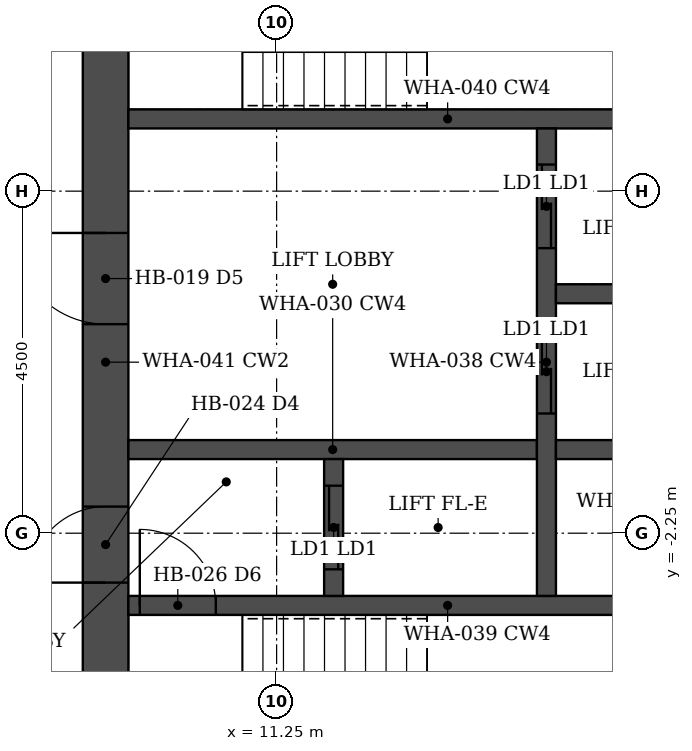
"""IFC4 building model, lengths in metres.
Left out: names, types, materials, properties, quantities, classifications, styles, units other than length and angle.
Written with IfcOpenShell. Run it as: python <this file> out.ifc"""

import sys

from ifc_helpers import new_model, si_unit, direction, frame, frame_2d, origin, place, context, subcontext, project, spatial, rectangle, extrude, element, fill, save


model = new_model("IFC4")
c1 = context("Model", 3, precision=1e-05, world=origin(), true_north=direction((0.0, 1.0)))
c2 = subcontext(c1, "Body", "Model", "MODEL_VIEW")
j1 = project(units=[si_unit("LENGTHUNIT", "METRE"), si_unit("PLANEANGLEUNIT", "RADIAN")], contexts=[c1])
p1 = place(None, origin())
s1 = spatial("IfcSite", under=j1, at=p1, CompositionType="ELEMENT")
p2 = place(p1, origin())
s2 = spatial("IfcBuilding", under=s1, at=p2, CompositionType="ELEMENT")
p3 = place(p2, frame((0.0, 0.0, 129.2)))
s3 = spatial("IfcBuildingStorey", under=s2, at=p3, CompositionType="ELEMENT", Elevation=129.2)
p4 = place(p3, frame((9.0, -6.45, 0.0), z_axis=(0.0, 0.0, 1.0), x_axis=(0.0, 1.0, 0.0)))
e1 = element("IfcWall", 1, at=p4, inside=s3, PredefinedType="SHEAR", context=c2, shape_type="SweptSolid", body=[
    extrude(rectangle(XDim=12.9, YDim=0.6, at=frame_2d((6.45, 0.0))), origin(), (0.0, 0.0, 1.0), 3.6),
])
p5 = place(p4, frame((3.55, 0.0, 0.0)))
e2 = element("IfcOpeningElement", 2, at=p5, cuts=e1, PredefinedType="OPENING", context=c2, shape_type="SweptSolid", body=[
    extrude(rectangle(XDim=1.0, YDim=2.1, at=frame_2d((0.5, 1.05))), frame((0.0, 0.31, 0.0), z_axis=(0.0, -1.0, 0.0), x_axis=(1.0, 0.0, 0.0)), (0.0, 0.0, 1.0), 0.62),
])
p6 = place(p4, frame((6.95, 0.0, 0.0)))
e3 = element("IfcOpeningElement", 3, at=p6, cuts=e1, PredefinedType="OPENING", context=c2, shape_type="SweptSolid", body=[
    extrude(rectangle(XDim=1.2, YDim=2.1, at=frame_2d((0.6, 1.05))), frame((0.0, 0.31, 0.0), z_axis=(0.0, -1.0, 0.0), x_axis=(1.0, 0.0, 0.0)), (0.0, 0.0, 1.0), 0.62),
])
p7 = place(p4, frame((10.85, 0.0, 0.0)))
e4 = element("IfcOpeningElement", 4, at=p7, cuts=e1, PredefinedType="OPENING", context=c2, shape_type="SweptSolid", body=[
    extrude(rectangle(XDim=1.0, YDim=2.1, at=frame_2d((0.5, 1.05))), frame((0.0, 0.31, 0.0), z_axis=(0.0, -1.0, 0.0), x_axis=(1.0, 0.0, 0.0)), (0.0, 0.0, 1.0), 0.62),
])
p8 = place(p3, frame((9.3, -3.2, 0.0), z_axis=(0.0, 0.0, 1.0), x_axis=(1.0, 0.0, 0.0)))
e5 = element("IfcWall", 5, at=p8, inside=s3, PredefinedType="SHEAR", context=c2, shape_type="SweptSolid", body=[
    extrude(rectangle(XDim=8.4, YDim=0.25, at=frame_2d((4.2, 0.0))), origin(), (0.0, 0.0, 1.0), 3.6),
])
p9 = place(p8, frame((0.15, 0.0, 0.0)))
e6 = element("IfcOpeningElement", 6, at=p9, cuts=e5, PredefinedType="OPENING", context=c2, shape_type="SweptSolid", body=[
    extrude(rectangle(XDim=1.0, YDim=2.1, at=frame_2d((0.5, 1.05))), frame((0.0, 0.135, 0.0), z_axis=(0.0, -1.0, 0.0), x_axis=(1.0, 0.0, 0.0)), (0.0, 0.0, 1.0), 0.27),
])
p10 = place(p3, frame((9.3, 3.2, 0.0), z_axis=(0.0, 0.0, 1.0), x_axis=(1.0, 0.0, 0.0)))
e7 = element("IfcWall", 7, at=p10, inside=s3, PredefinedType="SHEAR", context=c2, shape_type="SweptSolid", body=[
    extrude(rectangle(XDim=8.4, YDim=0.25, at=frame_2d((4.2, 0.0))), origin(), (0.0, 0.0, 1.0), 3.6),
])
p11 = place(p3, frame((9.3, -1.15, 0.0), z_axis=(0.0, 0.0, 1.0), x_axis=(1.0, 0.0, 0.0)))
e8 = element("IfcWall", 8, at=p11, inside=s3, PredefinedType="SHEAR", context=c2, shape_type="SweptSolid", body=[
    extrude(rectangle(XDim=5.375, YDim=0.25, at=frame_2d((2.688, 0.0))), origin(), (0.0, 0.0, 1.0), 3.6),
])
p12 = place(p3, frame((12.0, -3.075, 0.0), z_axis=(0.0, 0.0, 1.0), x_axis=(0.0, 1.0, 0.0)))
e9 = element("IfcWall", 9, at=p12, inside=s3, PredefinedType="SHEAR", context=c2, shape_type="SweptSolid", body=[
    extrude(rectangle(XDim=1.8, YDim=0.25, at=frame_2d((0.9, 0.0))), origin(), (0.0, 0.0, 1.0), 3.6),
])
p13 = place(p12, frame((0.35, 0.0, 0.0)))
e10 = element("IfcOpeningElement", 10, at=p13, cuts=e9, PredefinedType="OPENING", context=c2, shape_type="SweptSolid", body=[
    extrude(rectangle(XDim=1.1, YDim=2.1, at=frame_2d((0.55, 1.05))), frame((0.0, 0.135, 0.0), z_axis=(0.0, -1.0, 0.0), x_axis=(1.0, 0.0, 0.0)), (0.0, 0.0, 1.0), 0.27),
])
p14 = place(p3, frame((14.8, -3.075, 0.0), z_axis=(0.0, 0.0, 1.0), x_axis=(0.0, 1.0, 0.0)))
e11 = element("IfcWall", 11, at=p14, inside=s3, PredefinedType="SHEAR", context=c2, shape_type="SweptSolid", body=[
    extrude(rectangle(XDim=6.15, YDim=0.25, at=frame_2d((3.075, 0.0))), origin(), (0.0, 0.0, 1.0), 3.6),
])
p15 = place(p14, frame((2.4, 0.0, 0.0)))
e12 = element("IfcOpeningElement", 12, at=p15, cuts=e11, PredefinedType="OPENING", context=c2, shape_type="SweptSolid", body=[
    extrude(rectangle(XDim=1.1, YDim=2.1, at=frame_2d((0.55, 1.05))), frame((0.0, 0.135, 0.0), z_axis=(0.0, -1.0, 0.0), x_axis=(1.0, 0.0, 0.0)), (0.0, 0.0, 1.0), 0.27),
])
p16 = place(p14, frame((4.575, 0.0, 0.0)))
e13 = element("IfcOpeningElement", 13, at=p16, cuts=e11, PredefinedType="OPENING", context=c2, shape_type="SweptSolid", body=[
    extrude(rectangle(XDim=1.1, YDim=2.1, at=frame_2d((0.55, 1.05))), frame((0.0, 0.135, 0.0), z_axis=(0.0, -1.0, 0.0), x_axis=(1.0, 0.0, 0.0)), (0.0, 0.0, 1.0), 0.27),
])
for number, where, z_axis, x_axis in (
    (14, (14.925, -1.15, 0.0), (0.0, 0.0, 1.0), (1.0, 0.0, 0.0)),
    (15, (14.925, 0.9, 0.0), (0.0, 0.0, 1.0), (1.0, 0.0, 0.0)),
):
    element("IfcWall", number, at=place(p3, frame(where, z_axis=z_axis, x_axis=x_axis)), inside=s3, PredefinedType="SHEAR", context=c2, shape_type="SweptSolid", body=[
        extrude(rectangle(XDim=2.775, YDim=0.25, at=frame_2d((1.387, 0.0))), origin(), (0.0, 0.0, 1.0), 3.6),
    ])
p17 = place(p5, origin())
e16 = element("IfcDoor", 16, at=p17, inside=s3, OperationType="SINGLE_SWING_LEFT", PredefinedType="DOOR", context=c2, shape_type="SweptSolid", body=[
    extrude(rectangle(XDim=1.0, YDim=2.1, at=frame_2d((0.5, 1.05))), frame((0.0, 0.025, 0.0), z_axis=(0.0, -1.0, 0.0), x_axis=(1.0, 0.0, 0.0)), (0.0, 0.0, 1.0), 0.05),
])
fill(e2, e16)
p18 = place(p9, origin())
e17 = element("IfcDoor", 17, at=p18, inside=s3, OperationType="SINGLE_SWING_LEFT", PredefinedType="DOOR", context=c2, shape_type="SweptSolid", body=[
    extrude(rectangle(XDim=1.0, YDim=2.1, at=frame_2d((0.5, 1.05))), frame((0.0, 0.025, 0.0), z_axis=(0.0, -1.0, 0.0), x_axis=(1.0, 0.0, 0.0)), (0.0, 0.0, 1.0), 0.05),
])
fill(e6, e17)
p19 = place(p6, origin())
e18 = element("IfcDoor", 18, at=p19, inside=s3, OperationType="SINGLE_SWING_RIGHT", PredefinedType="DOOR", context=c2, shape_type="SweptSolid", body=[
    extrude(rectangle(XDim=1.2, YDim=2.1, at=frame_2d((0.6, 1.05))), frame((0.0, 0.025, 0.0), z_axis=(0.0, -1.0, 0.0), x_axis=(1.0, 0.0, 0.0)), (0.0, 0.0, 1.0), 0.05),
])
fill(e3, e18)
p20 = place(p13, origin())
e19 = element("IfcDoor", 19, at=p20, inside=s3, OperationType="DOUBLE_DOOR_SLIDING", PredefinedType="DOOR", context=c2, shape_type="SweptSolid", body=[
    extrude(rectangle(XDim=1.1, YDim=2.1, at=frame_2d((0.55, 1.05))), frame((0.0, 0.025, 0.0), z_axis=(0.0, -1.0, 0.0), x_axis=(1.0, 0.0, 0.0)), (0.0, 0.0, 1.0), 0.05),
])
fill(e10, e19)
p21 = place(p15, origin())
e20 = element("IfcDoor", 20, at=p21, inside=s3, OperationType="DOUBLE_DOOR_SLIDING", PredefinedType="DOOR", context=c2, shape_type="SweptSolid", body=[
    extrude(rectangle(XDim=1.1, YDim=2.1, at=frame_2d((0.55, 1.05))), frame((0.0, 0.025, 0.0), z_axis=(0.0, -1.0, 0.0), x_axis=(1.0, 0.0, 0.0)), (0.0, 0.0, 1.0), 0.05),
])
fill(e12, e20)
p22 = place(p16, origin())
e21 = element("IfcDoor", 21, at=p22, inside=s3, OperationType="DOUBLE_DOOR_SLIDING", PredefinedType="DOOR", context=c2, shape_type="SweptSolid", body=[
    extrude(rectangle(XDim=1.1, YDim=2.1, at=frame_2d((0.55, 1.05))), frame((0.0, 0.025, 0.0), z_axis=(0.0, -1.0, 0.0), x_axis=(1.0, 0.0, 0.0)), (0.0, 0.0, 1.0), 0.05),
])
fill(e13, e21)
save(model, sys.argv[1])
